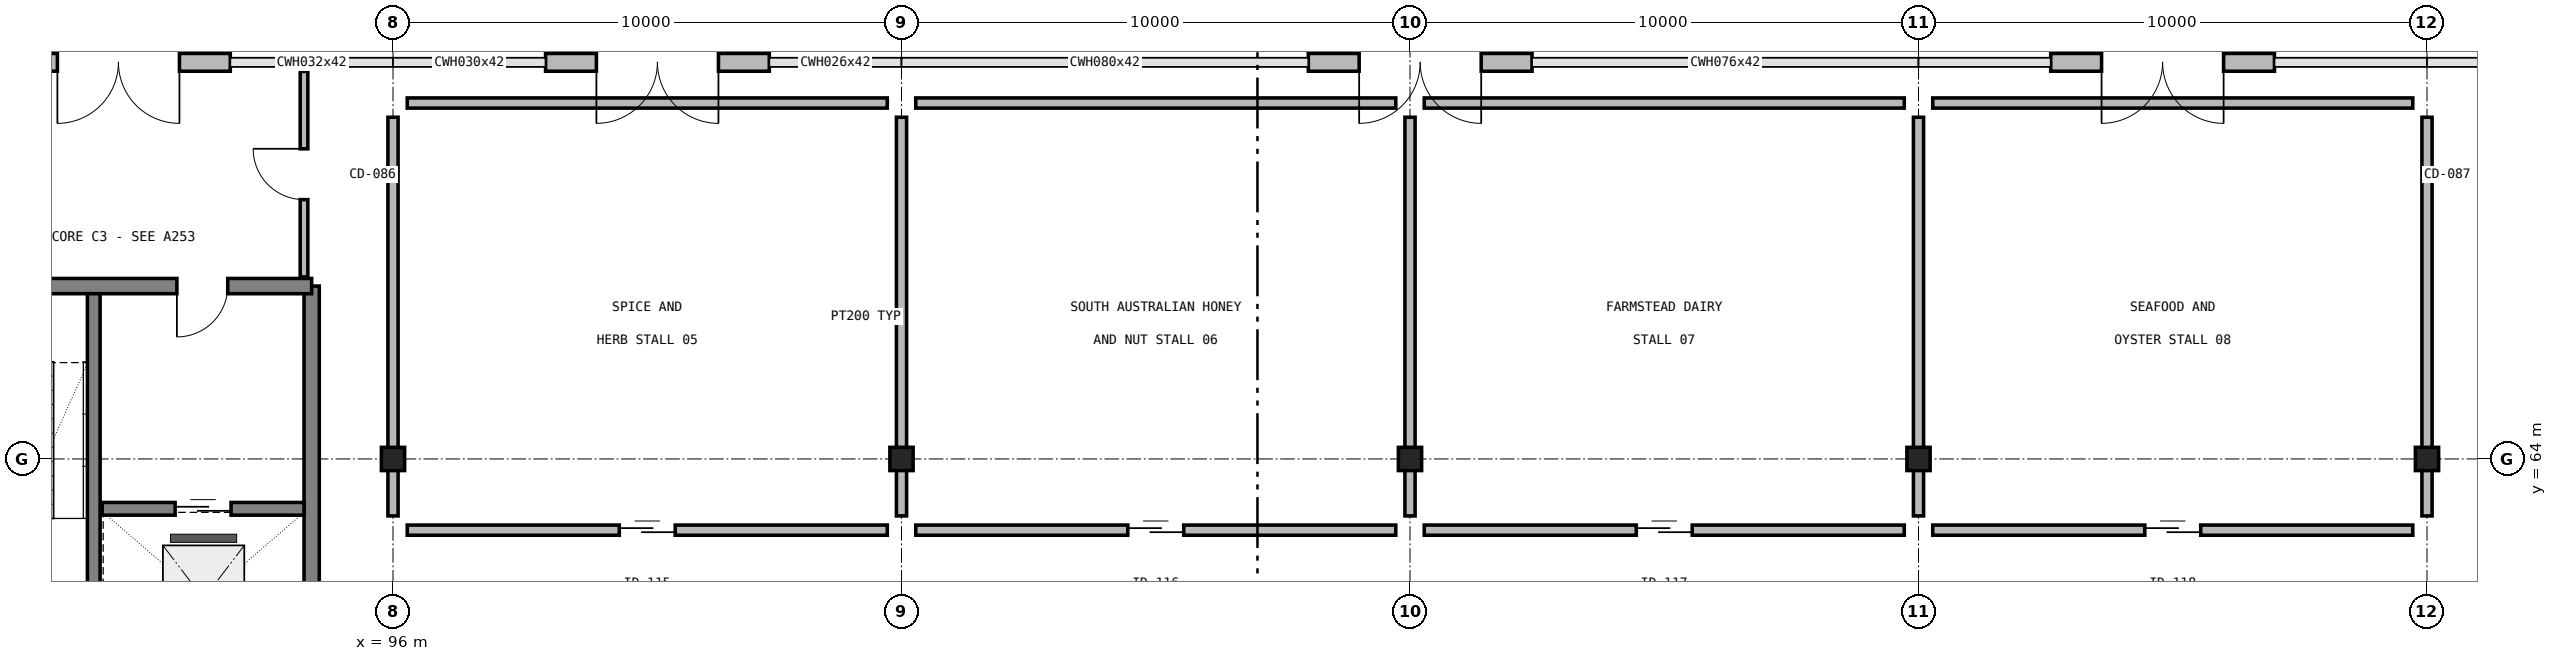
"""IFC4 building model, lengths in metres.
Left out: names, types, materials, properties, quantities, classifications, styles, units other than length and angle.
Written with IfcOpenShell. Run it as: python <this file> out.ifc"""

import sys

from ifc_helpers import new_model, si_unit, direction, frame, frame_2d, origin, origin_2d_with_axis, place, context, subcontext, project, spatial, rectangle, hollow_circle, extrude, element, fill, save


model = new_model("IFC4")
c1 = context("Model", 3, precision=1e-05, world=origin(), true_north=direction((0.0, 1.0)))
c2 = subcontext(c1, "Body", "Model", "MODEL_VIEW")
j1 = project(units=[si_unit("LENGTHUNIT", "METRE"), si_unit("PLANEANGLEUNIT", "RADIAN")], contexts=[c1])
p1 = place(None, origin())
s1 = spatial("IfcSite", under=j1, at=p1, CompositionType="ELEMENT")
p2 = place(p1, origin())
s2 = spatial("IfcBuilding", under=s1, at=p2, CompositionType="ELEMENT")
p3 = place(p2, origin())
s3 = spatial("IfcBuildingStorey", under=s2, at=p3, CompositionType="ELEMENT", Elevation=0.0)
for number, where, z_axis, x_axis in (
    (1, (96.0, 64.0, 0.0), (0.0, 0.0, 1.0), (1.0, 0.0, 0.0)),
    (2, (106.0, 64.0, 0.0), (0.0, 0.0, 1.0), (1.0, 0.0, 0.0)),
    (3, (116.0, 64.0, 0.0), (0.0, 0.0, 1.0), (1.0, 0.0, 0.0)),
    (4, (126.0, 64.0, 0.0), (0.0, 0.0, 1.0), (1.0, 0.0, 0.0)),
    (5, (136.0, 64.0, 0.0), (0.0, 0.0, 1.0), (1.0, 0.0, 0.0)),
):
    element("IfcColumn", number, at=place(p3, frame(where, z_axis=z_axis, x_axis=x_axis)), inside=s3, PredefinedType="COLUMN", context=c2, shape_type="SweptSolid", body=[
        extrude(hollow_circle(Radius=0.229, WallThickness=0.013, at=origin_2d_with_axis()), origin(), (0.0, 0.0, 1.0), 4.5),
    ])
p4 = place(p3, frame((92.8, 71.8, 0.0), z_axis=(0.0, 0.0, 1.0), x_axis=(-1.0, 0.0, 0.0)))
e6 = element("IfcWall", 6, at=p4, inside=s3, PredefinedType="SOLIDWALL", context=c2, shape_type="SweptSolid", body=[
    extrude(rectangle(XDim=4.4, YDim=0.35, at=frame_2d((2.2, 0.0), x_axis=(1.0, 0.0))), origin(), (0.0, 0.0, 1.0), 4.24),
])
p5 = place(p4, frame((1.0, 0.0, 0.0)))
e7 = element("IfcOpeningElement", 7, at=p5, cuts=e6, PredefinedType="OPENING", context=c2, shape_type="SweptSolid", body=[
    extrude(rectangle(XDim=2.4, YDim=2.8, at=frame_2d((1.2, 1.4), x_axis=(1.0, 0.0))), frame((0.0, 0.185, 0.0), z_axis=(0.0, -1.0, 0.0), x_axis=(1.0, 0.0, 0.0)), (0.0, 0.0, 1.0), 0.37),
])
p6 = place(p3, frame((103.4, 71.8, 0.0), z_axis=(0.0, 0.0, 1.0), x_axis=(-1.0, 0.0, 0.0)))
e8 = element("IfcWall", 8, at=p6, inside=s3, PredefinedType="SOLIDWALL", context=c2, shape_type="SweptSolid", body=[
    extrude(rectangle(XDim=4.4, YDim=0.35, at=frame_2d((2.2, 0.0), x_axis=(1.0, 0.0))), origin(), (0.0, 0.0, 1.0), 4.24),
])
p7 = place(p6, frame((1.0, 0.0, 0.0)))
e9 = element("IfcOpeningElement", 9, at=p7, cuts=e8, PredefinedType="OPENING", context=c2, shape_type="SweptSolid", body=[
    extrude(rectangle(XDim=2.4, YDim=2.8, at=frame_2d((1.2, 1.4), x_axis=(1.0, 0.0))), frame((0.0, 0.185, 0.0), z_axis=(0.0, -1.0, 0.0), x_axis=(1.0, 0.0, 0.0)), (0.0, 0.0, 1.0), 0.37),
])
p8 = place(p3, frame((118.4, 71.8, 0.0), z_axis=(0.0, 0.0, 1.0), x_axis=(-1.0, 0.0, 0.0)))
e10 = element("IfcWall", 10, at=p8, inside=s3, PredefinedType="SOLIDWALL", context=c2, shape_type="SweptSolid", body=[
    extrude(rectangle(XDim=4.4, YDim=0.35, at=frame_2d((2.2, 0.0), x_axis=(1.0, 0.0))), origin(), (0.0, 0.0, 1.0), 4.24),
])
p9 = place(p8, frame((1.0, 0.0, 0.0)))
e11 = element("IfcOpeningElement", 11, at=p9, cuts=e10, PredefinedType="OPENING", context=c2, shape_type="SweptSolid", body=[
    extrude(rectangle(XDim=2.4, YDim=2.8, at=frame_2d((1.2, 1.4), x_axis=(1.0, 0.0))), frame((0.0, 0.185, 0.0), z_axis=(0.0, -1.0, 0.0), x_axis=(1.0, 0.0, 0.0)), (0.0, 0.0, 1.0), 0.37),
])
p10 = place(p3, frame((133.0, 71.8, 0.0), z_axis=(0.0, 0.0, 1.0), x_axis=(-1.0, 0.0, 0.0)))
e12 = element("IfcWall", 12, at=p10, inside=s3, PredefinedType="SOLIDWALL", context=c2, shape_type="SweptSolid", body=[
    extrude(rectangle(XDim=4.4, YDim=0.35, at=frame_2d((2.2, 0.0), x_axis=(1.0, 0.0))), origin(), (0.0, 0.0, 1.0), 4.24),
])
p11 = place(p10, frame((1.0, 0.0, 0.0)))
e13 = element("IfcOpeningElement", 13, at=p11, cuts=e12, PredefinedType="OPENING", context=c2, shape_type="SweptSolid", body=[
    extrude(rectangle(XDim=2.4, YDim=2.8, at=frame_2d((1.2, 1.4), x_axis=(1.0, 0.0))), frame((0.0, 0.185, 0.0), z_axis=(0.0, -1.0, 0.0), x_axis=(1.0, 0.0, 0.0)), (0.0, 0.0, 1.0), 0.37),
])
p12 = place(p3, frame((94.4, 59.4, 0.0), z_axis=(0.0, 0.0, 1.0), x_axis=(0.0, 1.0, 0.0)))
e14 = element("IfcWall", 14, at=p12, inside=s3, PredefinedType="SHEAR", context=c2, shape_type="SweptSolid", body=[
    extrude(rectangle(XDim=8.0, YDim=0.3, at=frame_2d((4.0, 0.0), x_axis=(1.0, 0.0))), origin(), (0.0, 0.0, 1.0), 4.5),
])
p13 = place(p3, frame((94.4, 67.4, 0.0), z_axis=(0.0, 0.0, 1.0), x_axis=(-1.0, 0.0, 0.0)))
e15 = element("IfcWall", 15, at=p13, inside=s3, PredefinedType="SHEAR", context=c2, shape_type="SweptSolid", body=[
    extrude(rectangle(XDim=7.4, YDim=0.3, at=frame_2d((3.7, 0.0), x_axis=(1.0, 0.0))), origin(), (0.0, 0.0, 1.0), 4.5),
])
p14 = place(p13, frame((1.65, 0.0, 0.0)))
e16 = element("IfcOpeningElement", 16, at=p14, cuts=e15, PredefinedType="OPENING", context=c2, shape_type="SweptSolid", body=[
    extrude(rectangle(XDim=1.0, YDim=2.15, at=frame_2d((0.5, 1.075), x_axis=(1.0, 0.0))), frame((0.0, 0.16, 0.0), z_axis=(0.0, -1.0, 0.0), x_axis=(1.0, 0.0, 0.0)), (0.0, 0.0, 1.0), 0.32),
])
p15 = place(p13, frame((5.3, 0.0, 0.0)))
e17 = element("IfcOpeningElement", 17, at=p15, cuts=e15, PredefinedType="OPENING", context=c2, shape_type="SweptSolid", body=[
    extrude(rectangle(XDim=1.0, YDim=2.15, at=frame_2d((0.5, 1.075), x_axis=(1.0, 0.0))), frame((0.0, 0.16, 0.0), z_axis=(0.0, -1.0, 0.0), x_axis=(1.0, 0.0, 0.0)), (0.0, 0.0, 1.0), 0.32),
])
p16 = place(p3, frame((90.115, 59.55, 0.0), z_axis=(0.0, 0.0, 1.0), x_axis=(0.0, 1.0, 0.0)))
e18 = element("IfcWall", 18, at=p16, inside=s3, PredefinedType="SHEAR", context=c2, shape_type="SweptSolid", body=[
    extrude(rectangle(XDim=7.7, YDim=0.25, at=frame_2d((3.85, 0.0), x_axis=(1.0, 0.0))), origin(), (0.0, 0.0, 1.0), 4.5),
])
p17 = place(p3, frame((90.28, 63.02, 0.0), z_axis=(0.0, 0.0, 1.0), x_axis=(1.0, 0.0, 0.0)))
e19 = element("IfcWall", 19, at=p17, inside=s3, PredefinedType="SHEAR", context=c2, shape_type="SweptSolid", body=[
    extrude(rectangle(XDim=3.97, YDim=0.25, at=frame_2d((1.985, 0.0), x_axis=(1.0, 0.0))), origin(), (0.0, 0.0, 1.0), 4.24),
])
p18 = place(p17, frame((1.435, 0.0, 0.0)))
e20 = element("IfcOpeningElement", 20, at=p18, cuts=e19, PredefinedType="OPENING", context=c2, shape_type="SweptSolid", body=[
    extrude(rectangle(XDim=1.1, YDim=2.15, at=frame_2d((0.55, 1.075), x_axis=(1.0, 0.0))), frame((0.0, 0.135, 0.0), z_axis=(0.0, -1.0, 0.0), x_axis=(1.0, 0.0, 0.0)), (0.0, 0.0, 1.0), 0.27),
])
p19 = place(p3, frame((94.25, 67.58, 0.0), z_axis=(0.0, 0.0, 1.0), x_axis=(0.0, 1.0, 0.0)))
e21 = element("IfcWall", 21, at=p19, inside=s3, PredefinedType="PARTITIONING", context=c2, shape_type="SweptSolid", body=[
    extrude(rectangle(XDim=4.04, YDim=0.15, at=frame_2d((2.02, 0.0), x_axis=(1.0, 0.0))), origin(), (0.0, 0.0, 1.0), 4.2),
])
p20 = place(p19, frame((1.52, 0.0, 0.0)))
e22 = element("IfcOpeningElement", 22, at=p20, cuts=e21, PredefinedType="OPENING", context=c2, shape_type="SweptSolid", body=[
    extrude(rectangle(XDim=1.0, YDim=2.15, at=frame_2d((0.5, 1.075), x_axis=(1.0, 0.0))), frame((0.0, 0.085, 0.0), z_axis=(0.0, -1.0, 0.0), x_axis=(1.0, 0.0, 0.0)), (0.0, 0.0, 1.0), 0.17),
])
p21 = place(p3, frame((96.28, 62.6, 0.0), z_axis=(0.0, 0.0, 1.0), x_axis=(1.0, 0.0, 0.0)))
e23 = element("IfcWall", 23, at=p21, inside=s3, PredefinedType="MOVABLE", context=c2, shape_type="SweptSolid", body=[
    extrude(rectangle(XDim=9.44, YDim=0.2, at=frame_2d((4.72, 0.0), x_axis=(1.0, 0.0))), origin(), (0.0, 0.0, 1.0), 3.62),
])
p22 = place(p21, frame((4.17, 0.0, 0.0)))
e24 = element("IfcOpeningElement", 24, at=p22, cuts=e23, PredefinedType="OPENING", context=c2, shape_type="SweptSolid", body=[
    extrude(rectangle(XDim=1.1, YDim=2.15, at=frame_2d((0.55, 1.075), x_axis=(1.0, 0.0))), frame((0.0, 0.11, 0.0), z_axis=(0.0, -1.0, 0.0), x_axis=(1.0, 0.0, 0.0)), (0.0, 0.0, 1.0), 0.22),
])
p23 = place(p3, frame((106.0, 62.88, 0.0), z_axis=(0.0, 0.0, 1.0), x_axis=(0.0, 1.0, 0.0)))
e25 = element("IfcWall", 25, at=p23, inside=s3, PredefinedType="MOVABLE", context=c2, shape_type="SweptSolid", body=[
    extrude(rectangle(XDim=7.84, YDim=0.2, at=frame_2d((3.92, 0.0), x_axis=(1.0, 0.0))), origin(), (0.0, 0.0, 1.0), 3.62),
])
p24 = place(p3, frame((105.72, 71.0, 0.0), z_axis=(0.0, 0.0, 1.0), x_axis=(-1.0, 0.0, 0.0)))
e26 = element("IfcWall", 26, at=p24, inside=s3, PredefinedType="MOVABLE", context=c2, shape_type="SweptSolid", body=[
    extrude(rectangle(XDim=9.44, YDim=0.2, at=frame_2d((4.72, 0.0), x_axis=(1.0, 0.0))), origin(), (0.0, 0.0, 1.0), 3.62),
])
p25 = place(p3, frame((96.0, 70.72, 0.0), z_axis=(0.0, 0.0, 1.0), x_axis=(0.0, -1.0, 0.0)))
e27 = element("IfcWall", 27, at=p25, inside=s3, PredefinedType="MOVABLE", context=c2, shape_type="SweptSolid", body=[
    extrude(rectangle(XDim=7.84, YDim=0.2, at=frame_2d((3.92, 0.0), x_axis=(1.0, 0.0))), origin(), (0.0, 0.0, 1.0), 3.62),
])
p26 = place(p3, frame((106.28, 62.6, 0.0), z_axis=(0.0, 0.0, 1.0), x_axis=(1.0, 0.0, 0.0)))
e28 = element("IfcWall", 28, at=p26, inside=s3, PredefinedType="MOVABLE", context=c2, shape_type="SweptSolid", body=[
    extrude(rectangle(XDim=9.44, YDim=0.2, at=frame_2d((4.72, 0.0), x_axis=(1.0, 0.0))), origin(), (0.0, 0.0, 1.0), 3.62),
])
p27 = place(p26, frame((4.17, 0.0, 0.0)))
e29 = element("IfcOpeningElement", 29, at=p27, cuts=e28, PredefinedType="OPENING", context=c2, shape_type="SweptSolid", body=[
    extrude(rectangle(XDim=1.1, YDim=2.15, at=frame_2d((0.55, 1.075), x_axis=(1.0, 0.0))), frame((0.0, 0.11, 0.0), z_axis=(0.0, -1.0, 0.0), x_axis=(1.0, 0.0, 0.0)), (0.0, 0.0, 1.0), 0.22),
])
p28 = place(p3, frame((116.0, 62.88, 0.0), z_axis=(0.0, 0.0, 1.0), x_axis=(0.0, 1.0, 0.0)))
e30 = element("IfcWall", 30, at=p28, inside=s3, PredefinedType="MOVABLE", context=c2, shape_type="SweptSolid", body=[
    extrude(rectangle(XDim=7.84, YDim=0.2, at=frame_2d((3.92, 0.0), x_axis=(1.0, 0.0))), origin(), (0.0, 0.0, 1.0), 3.62),
])
p29 = place(p3, frame((115.72, 71.0, 0.0), z_axis=(0.0, 0.0, 1.0), x_axis=(-1.0, 0.0, 0.0)))
e31 = element("IfcWall", 31, at=p29, inside=s3, PredefinedType="MOVABLE", context=c2, shape_type="SweptSolid", body=[
    extrude(rectangle(XDim=9.44, YDim=0.2, at=frame_2d((4.72, 0.0), x_axis=(1.0, 0.0))), origin(), (0.0, 0.0, 1.0), 3.62),
])
p30 = place(p3, frame((116.28, 62.6, 0.0), z_axis=(0.0, 0.0, 1.0), x_axis=(1.0, 0.0, 0.0)))
e32 = element("IfcWall", 32, at=p30, inside=s3, PredefinedType="MOVABLE", context=c2, shape_type="SweptSolid", body=[
    extrude(rectangle(XDim=9.44, YDim=0.2, at=frame_2d((4.72, 0.0), x_axis=(1.0, 0.0))), origin(), (0.0, 0.0, 1.0), 3.62),
])
p31 = place(p30, frame((4.17, 0.0, 0.0)))
e33 = element("IfcOpeningElement", 33, at=p31, cuts=e32, PredefinedType="OPENING", context=c2, shape_type="SweptSolid", body=[
    extrude(rectangle(XDim=1.1, YDim=2.15, at=frame_2d((0.55, 1.075), x_axis=(1.0, 0.0))), frame((0.0, 0.11, 0.0), z_axis=(0.0, -1.0, 0.0), x_axis=(1.0, 0.0, 0.0)), (0.0, 0.0, 1.0), 0.22),
])
p32 = place(p3, frame((126.0, 62.88, 0.0), z_axis=(0.0, 0.0, 1.0), x_axis=(0.0, 1.0, 0.0)))
e34 = element("IfcWall", 34, at=p32, inside=s3, PredefinedType="MOVABLE", context=c2, shape_type="SweptSolid", body=[
    extrude(rectangle(XDim=7.84, YDim=0.2, at=frame_2d((3.92, 0.0), x_axis=(1.0, 0.0))), origin(), (0.0, 0.0, 1.0), 3.62),
])
p33 = place(p3, frame((125.72, 71.0, 0.0), z_axis=(0.0, 0.0, 1.0), x_axis=(-1.0, 0.0, 0.0)))
e35 = element("IfcWall", 35, at=p33, inside=s3, PredefinedType="MOVABLE", context=c2, shape_type="SweptSolid", body=[
    extrude(rectangle(XDim=9.44, YDim=0.2, at=frame_2d((4.72, 0.0), x_axis=(1.0, 0.0))), origin(), (0.0, 0.0, 1.0), 3.62),
])
p34 = place(p3, frame((126.28, 62.6, 0.0), z_axis=(0.0, 0.0, 1.0), x_axis=(1.0, 0.0, 0.0)))
e36 = element("IfcWall", 36, at=p34, inside=s3, PredefinedType="MOVABLE", context=c2, shape_type="SweptSolid", body=[
    extrude(rectangle(XDim=9.44, YDim=0.2, at=frame_2d((4.72, 0.0), x_axis=(1.0, 0.0))), origin(), (0.0, 0.0, 1.0), 3.62),
])
p35 = place(p34, frame((4.17, 0.0, 0.0)))
e37 = element("IfcOpeningElement", 37, at=p35, cuts=e36, PredefinedType="OPENING", context=c2, shape_type="SweptSolid", body=[
    extrude(rectangle(XDim=1.1, YDim=2.15, at=frame_2d((0.55, 1.075), x_axis=(1.0, 0.0))), frame((0.0, 0.11, 0.0), z_axis=(0.0, -1.0, 0.0), x_axis=(1.0, 0.0, 0.0)), (0.0, 0.0, 1.0), 0.22),
])
p36 = place(p3, frame((136.0, 62.88, 0.0), z_axis=(0.0, 0.0, 1.0), x_axis=(0.0, 1.0, 0.0)))
e38 = element("IfcWall", 38, at=p36, inside=s3, PredefinedType="MOVABLE", context=c2, shape_type="SweptSolid", body=[
    extrude(rectangle(XDim=7.84, YDim=0.2, at=frame_2d((3.92, 0.0), x_axis=(1.0, 0.0))), origin(), (0.0, 0.0, 1.0), 3.62),
])
p37 = place(p3, frame((135.72, 71.0, 0.0), z_axis=(0.0, 0.0, 1.0), x_axis=(-1.0, 0.0, 0.0)))
e39 = element("IfcWall", 39, at=p37, inside=s3, PredefinedType="MOVABLE", context=c2, shape_type="SweptSolid", body=[
    extrude(rectangle(XDim=9.44, YDim=0.2, at=frame_2d((4.72, 0.0), x_axis=(1.0, 0.0))), origin(), (0.0, 0.0, 1.0), 3.62),
])
p38 = place(p5, origin())
e40 = element("IfcDoor", 40, at=p38, inside=s3, OperationType="DOUBLE_SWING_RIGHT", PredefinedType="DOOR", context=c2, shape_type="SweptSolid", body=[
    extrude(rectangle(XDim=2.4, YDim=2.8, at=frame_2d((1.2, 1.4), x_axis=(1.0, 0.0))), frame((0.0, 0.025, 0.0), z_axis=(0.0, -1.0, 0.0), x_axis=(1.0, 0.0, 0.0)), (0.0, 0.0, 1.0), 0.05),
])
fill(e7, e40)
p39 = place(p7, origin())
e41 = element("IfcDoor", 41, at=p39, inside=s3, OperationType="DOUBLE_SWING_RIGHT", PredefinedType="DOOR", context=c2, shape_type="SweptSolid", body=[
    extrude(rectangle(XDim=2.4, YDim=2.8, at=frame_2d((1.2, 1.4), x_axis=(1.0, 0.0))), frame((0.0, 0.025, 0.0), z_axis=(0.0, -1.0, 0.0), x_axis=(1.0, 0.0, 0.0)), (0.0, 0.0, 1.0), 0.05),
])
fill(e9, e41)
p40 = place(p9, origin())
e42 = element("IfcDoor", 42, at=p40, inside=s3, OperationType="DOUBLE_SWING_RIGHT", PredefinedType="DOOR", context=c2, shape_type="SweptSolid", body=[
    extrude(rectangle(XDim=2.4, YDim=2.8, at=frame_2d((1.2, 1.4), x_axis=(1.0, 0.0))), frame((0.0, 0.025, 0.0), z_axis=(0.0, -1.0, 0.0), x_axis=(1.0, 0.0, 0.0)), (0.0, 0.0, 1.0), 0.05),
])
fill(e11, e42)
p41 = place(p11, origin())
e43 = element("IfcDoor", 43, at=p41, inside=s3, OperationType="DOUBLE_SWING_RIGHT", PredefinedType="DOOR", context=c2, shape_type="SweptSolid", body=[
    extrude(rectangle(XDim=2.4, YDim=2.8, at=frame_2d((1.2, 1.4), x_axis=(1.0, 0.0))), frame((0.0, 0.025, 0.0), z_axis=(0.0, -1.0, 0.0), x_axis=(1.0, 0.0, 0.0)), (0.0, 0.0, 1.0), 0.05),
])
fill(e13, e43)
p42 = place(p14, origin())
e44 = element("IfcDoor", 44, at=p42, inside=s3, OperationType="SINGLE_SWING_RIGHT", PredefinedType="DOOR", context=c2, shape_type="SweptSolid", body=[
    extrude(rectangle(XDim=1.0, YDim=2.15, at=frame_2d((0.5, 1.075), x_axis=(1.0, 0.0))), frame((0.0, 0.025, 0.0), z_axis=(0.0, -1.0, 0.0), x_axis=(1.0, 0.0, 0.0)), (0.0, 0.0, 1.0), 0.05),
])
fill(e16, e44)
p43 = place(p18, origin())
e45 = element("IfcDoor", 45, at=p43, inside=s3, OperationType="SLIDING_TO_LEFT", PredefinedType="DOOR", context=c2, shape_type="SweptSolid", body=[
    extrude(rectangle(XDim=1.1, YDim=2.15, at=frame_2d((0.55, 1.075), x_axis=(1.0, 0.0))), frame((0.0, 0.025, 0.0), z_axis=(0.0, -1.0, 0.0), x_axis=(1.0, 0.0, 0.0)), (0.0, 0.0, 1.0), 0.05),
])
fill(e20, e45)
p44 = place(p20, origin())
e46 = element("IfcDoor", 46, at=p44, inside=s3, OperationType="SINGLE_SWING_RIGHT", PredefinedType="DOOR", context=c2, shape_type="SweptSolid", body=[
    extrude(rectangle(XDim=1.0, YDim=2.15, at=frame_2d((0.5, 1.075), x_axis=(1.0, 0.0))), frame((0.0, 0.025, 0.0), z_axis=(0.0, -1.0, 0.0), x_axis=(1.0, 0.0, 0.0)), (0.0, 0.0, 1.0), 0.05),
])
fill(e22, e46)
p45 = place(p22, origin())
e47 = element("IfcDoor", 47, at=p45, inside=s3, OperationType="SLIDING_TO_LEFT", PredefinedType="DOOR", context=c2, shape_type="SweptSolid", body=[
    extrude(rectangle(XDim=1.1, YDim=2.15, at=frame_2d((0.55, 1.075), x_axis=(1.0, 0.0))), frame((0.0, 0.025, 0.0), z_axis=(0.0, -1.0, 0.0), x_axis=(1.0, 0.0, 0.0)), (0.0, 0.0, 1.0), 0.05),
])
fill(e24, e47)
p46 = place(p27, origin())
e48 = element("IfcDoor", 48, at=p46, inside=s3, OperationType="SLIDING_TO_LEFT", PredefinedType="DOOR", context=c2, shape_type="SweptSolid", body=[
    extrude(rectangle(XDim=1.1, YDim=2.15, at=frame_2d((0.55, 1.075), x_axis=(1.0, 0.0))), frame((0.0, 0.025, 0.0), z_axis=(0.0, -1.0, 0.0), x_axis=(1.0, 0.0, 0.0)), (0.0, 0.0, 1.0), 0.05),
])
fill(e29, e48)
p47 = place(p31, origin())
e49 = element("IfcDoor", 49, at=p47, inside=s3, OperationType="SLIDING_TO_LEFT", PredefinedType="DOOR", context=c2, shape_type="SweptSolid", body=[
    extrude(rectangle(XDim=1.1, YDim=2.15, at=frame_2d((0.55, 1.075), x_axis=(1.0, 0.0))), frame((0.0, 0.025, 0.0), z_axis=(0.0, -1.0, 0.0), x_axis=(1.0, 0.0, 0.0)), (0.0, 0.0, 1.0), 0.05),
])
fill(e33, e49)
p48 = place(p35, origin())
e50 = element("IfcDoor", 50, at=p48, inside=s3, OperationType="SLIDING_TO_LEFT", PredefinedType="DOOR", context=c2, shape_type="SweptSolid", body=[
    extrude(rectangle(XDim=1.1, YDim=2.15, at=frame_2d((0.55, 1.075), x_axis=(1.0, 0.0))), frame((0.0, 0.025, 0.0), z_axis=(0.0, -1.0, 0.0), x_axis=(1.0, 0.0, 0.0)), (0.0, 0.0, 1.0), 0.05),
])
fill(e37, e50)
save(model, sys.argv[1])
